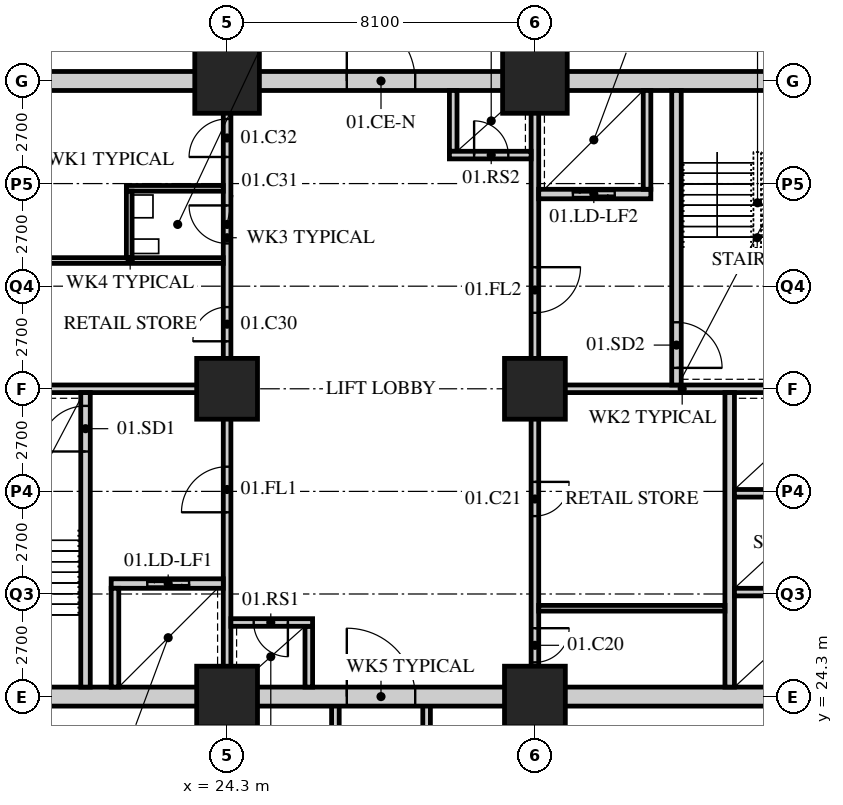
"""IFC4 building model, lengths in metres.
Left out: names, types, materials, properties, quantities, classifications, styles, units other than length and angle.
Written with IfcOpenShell. Run it as: python <this file> out.ifc"""

import sys

from ifc_helpers import new_model, si_unit, direction, frame, frame_2d, origin, origin_2d, place, context, subcontext, project, spatial, rectangle, hollow_rectangle, extrude, element, fill, save


model = new_model("IFC4")
c1 = context("Model", 3, precision=1e-05, world=origin(), true_north=direction((0.0, 1.0)))
c2 = subcontext(c1, "Body", "Model", "MODEL_VIEW")
j1 = project(units=[si_unit("LENGTHUNIT", "METRE"), si_unit("PLANEANGLEUNIT", "RADIAN")], contexts=[c1])
p1 = place(None, origin())
s1 = spatial("IfcSite", under=j1, at=p1, CompositionType="ELEMENT")
p2 = place(p1, origin())
s2 = spatial("IfcBuilding", under=s1, at=p2, CompositionType="ELEMENT")
p3 = place(p2, frame((0.0, 0.0, 6.0)))
s3 = spatial("IfcBuildingStorey", under=s2, at=p3, CompositionType="ELEMENT", Elevation=6.0)
for number, where, z_axis, x_axis in (
    (1, (24.3, 24.3, 0.0), (0.0, 0.0, 1.0), (1.0, 0.0, 0.0)),
    (2, (24.3, 32.4, 0.0), (0.0, 0.0, 1.0), (1.0, 0.0, 0.0)),
):
    element("IfcColumn", number, at=place(p3, frame(where, z_axis=z_axis, x_axis=x_axis)), inside=s3, PredefinedType="COLUMN", context=c2, shape_type="SweptSolid", body=[
        extrude(hollow_rectangle(XDim=1.6, YDim=1.6, WallThickness=0.15, at=origin_2d()), origin(), (0.0, 0.0, 1.0), 5.4),
    ])
p4 = place(p3, frame((24.3, 40.5, 0.0), z_axis=(0.0, 0.0, 1.0), x_axis=(1.0, 0.0, 0.0)))
e3 = element("IfcColumn", 3, at=p4, inside=s3, PredefinedType="COLUMN", context=c2, shape_type="SweptSolid", body=[
    extrude(hollow_rectangle(XDim=1.7, YDim=1.7, WallThickness=0.16, at=origin_2d()), origin(), (0.0, 0.0, 1.0), 5.4),
])
for number, where, z_axis, x_axis in (
    (4, (32.4, 24.3, 0.0), (0.0, 0.0, 1.0), (1.0, 0.0, 0.0)),
    (5, (32.4, 32.4, 0.0), (0.0, 0.0, 1.0), (1.0, 0.0, 0.0)),
):
    element("IfcColumn", number, at=place(p3, frame(where, z_axis=z_axis, x_axis=x_axis)), inside=s3, PredefinedType="COLUMN", context=c2, shape_type="SweptSolid", body=[
        extrude(hollow_rectangle(XDim=1.6, YDim=1.6, WallThickness=0.15, at=origin_2d()), origin(), (0.0, 0.0, 1.0), 5.4),
    ])
p5 = place(p3, frame((32.4, 40.5, 0.0), z_axis=(0.0, 0.0, 1.0), x_axis=(1.0, 0.0, 0.0)))
e6 = element("IfcColumn", 6, at=p5, inside=s3, PredefinedType="COLUMN", context=c2, shape_type="SweptSolid", body=[
    extrude(hollow_rectangle(XDim=1.7, YDim=1.7, WallThickness=0.16, at=origin_2d()), origin(), (0.0, 0.0, 1.0), 5.4),
])
for number, where, z_axis, x_axis in (
    (7, (27.15, 3.6, 0.0), (0.0, 0.0, 1.0), (0.0, 1.0, 0.0)),
    (8, (29.55, 3.6, 0.0), (0.0, 0.0, 1.0), (0.0, 1.0, 0.0)),
):
    element("IfcWall", number, at=place(p3, frame(where, z_axis=z_axis, x_axis=x_axis)), inside=s3, PredefinedType="SOLIDWALL", context=c2, shape_type="SweptSolid", body=[
        extrude(rectangle(XDim=20.7, YDim=0.2, at=frame_2d((10.35, 0.0))), origin(), (0.0, 0.0, 1.0), 5.15),
    ])
p6 = place(p3, frame((15.95, 24.3, 0.0), z_axis=(0.0, 0.0, 1.0), x_axis=(1.0, 0.0, 0.0)))
e9 = element("IfcWall", 9, at=p6, inside=s3, PredefinedType="SOLIDWALL", context=c2, shape_type="SweptSolid", body=[
    extrude(rectangle(XDim=24.8, YDim=0.5, at=frame_2d((12.4, 0.0))), origin(), (0.0, 0.0, 1.0), 4.5),
])
p7 = place(p6, frame((11.5, 0.0, 0.0)))
e10 = element("IfcOpeningElement", 10, at=p7, cuts=e9, PredefinedType="OPENING", context=c2, shape_type="SweptSolid", body=[
    extrude(rectangle(XDim=1.8, YDim=2.4, at=frame_2d((0.9, 1.2))), frame((0.0, 0.26, 0.0), z_axis=(0.0, -1.0, 0.0), x_axis=(1.0, 0.0, 0.0)), (0.0, 0.0, 1.0), 0.52),
])
p8 = place(p3, frame((15.95, 40.5, 0.0), z_axis=(0.0, 0.0, 1.0), x_axis=(1.0, 0.0, 0.0)))
e11 = element("IfcWall", 11, at=p8, inside=s3, PredefinedType="SOLIDWALL", context=c2, shape_type="SweptSolid", body=[
    extrude(rectangle(XDim=24.8, YDim=0.5, at=frame_2d((12.4, 0.0))), origin(), (0.0, 0.0, 1.0), 4.5),
])
p9 = place(p8, frame((11.5, 0.0, 0.0)))
e12 = element("IfcOpeningElement", 12, at=p9, cuts=e11, PredefinedType="OPENING", context=c2, shape_type="SweptSolid", body=[
    extrude(rectangle(XDim=1.8, YDim=2.4, at=frame_2d((0.9, 1.2))), frame((0.0, 0.26, 0.0), z_axis=(0.0, -1.0, 0.0), x_axis=(1.0, 0.0, 0.0)), (0.0, 0.0, 1.0), 0.52),
])
p10 = place(p3, frame((16.45, 32.4, 0.0), z_axis=(0.0, 0.0, 1.0), x_axis=(1.0, 0.0, 0.0)))
e13 = element("IfcWall", 13, at=p10, inside=s3, PredefinedType="SOLIDWALL", context=c2, shape_type="SweptSolid", body=[
    extrude(rectangle(XDim=7.95, YDim=0.2, at=frame_2d((3.975, 0.0))), origin(), (0.0, 0.0, 1.0), 4.45),
])
p11 = place(p3, frame((24.3, 24.55, 0.0), z_axis=(0.0, 0.0, 1.0), x_axis=(0.0, 1.0, 0.0)))
e14 = element("IfcWall", 14, at=p11, inside=s3, PredefinedType="SOLIDWALL", context=c2, shape_type="SweptSolid", body=[
    extrude(rectangle(XDim=7.75, YDim=0.2, at=frame_2d((3.875, 0.0))), origin(), (0.0, 0.0, 1.0), 4.45),
])
p12 = place(p11, frame((4.6, 0.0, 0.0)))
e15 = element("IfcOpeningElement", 15, at=p12, cuts=e14, PredefinedType="OPENING", context=c2, shape_type="SweptSolid", body=[
    extrude(rectangle(XDim=1.2, YDim=2.1, at=frame_2d((0.6, 1.05))), frame((0.0, 0.11, 0.0), z_axis=(0.0, -1.0, 0.0), x_axis=(1.0, 0.0, 0.0)), (0.0, 0.0, 1.0), 0.22),
])
p13 = place(p3, frame((20.575, 24.55, 0.0), z_axis=(0.0, 0.0, 1.0), x_axis=(0.0, 1.0, 0.0)))
e16 = element("IfcWall", 16, at=p13, inside=s3, PredefinedType="SOLIDWALL", context=c2, shape_type="SweptSolid", body=[
    extrude(rectangle(XDim=7.75, YDim=0.25, at=frame_2d((3.875, 0.0))), origin(), (0.0, 0.0, 1.0), 5.15),
])
p14 = place(p13, frame((6.2, 0.0, 0.0)))
e17 = element("IfcOpeningElement", 17, at=p14, cuts=e16, PredefinedType="OPENING", context=c2, shape_type="SweptSolid", body=[
    extrude(rectangle(XDim=1.2, YDim=2.1, at=frame_2d((0.6, 1.05))), frame((0.0, 0.135, 0.0), z_axis=(0.0, -1.0, 0.0), x_axis=(1.0, 0.0, 0.0)), (0.0, 0.0, 1.0), 0.27),
])
p15 = place(p3, frame((21.25, 27.275, 0.0), z_axis=(0.0, 0.0, 1.0), x_axis=(1.0, 0.0, 0.0)))
e18 = element("IfcWall", 18, at=p15, inside=s3, PredefinedType="SOLIDWALL", context=c2, shape_type="SweptSolid", body=[
    extrude(rectangle(XDim=2.95, YDim=0.25, at=frame_2d((1.475, 0.0))), origin(), (0.0, 0.0, 1.0), 5.15),
])
p16 = place(p15, frame((0.95, 0.0, 0.0)))
e19 = element("IfcOpeningElement", 19, at=p16, cuts=e18, PredefinedType="OPENING", context=c2, shape_type="SweptSolid", body=[
    extrude(rectangle(XDim=1.1, YDim=2.4, at=frame_2d((0.55, 1.2))), frame((0.0, 0.135, 0.0), z_axis=(0.0, -1.0, 0.0), x_axis=(1.0, 0.0, 0.0)), (0.0, 0.0, 1.0), 0.27),
])
p17 = place(p3, frame((21.35, 24.55, 0.0), z_axis=(0.0, 0.0, 1.0), x_axis=(0.0, 1.0, 0.0)))
e20 = element("IfcWall", 20, at=p17, inside=s3, PredefinedType="SOLIDWALL", context=c2, shape_type="SweptSolid", body=[
    extrude(rectangle(XDim=2.6, YDim=0.2, at=frame_2d((1.3, 0.0))), origin(), (0.0, 0.0, 1.0), 5.15),
])
p18 = place(p3, frame((26.45, 24.55, 0.0), z_axis=(0.0, 0.0, 1.0), x_axis=(0.0, 1.0, 0.0)))
e21 = element("IfcWall", 21, at=p18, inside=s3, PredefinedType="SOLIDWALL", context=c2, shape_type="SweptSolid", body=[
    extrude(rectangle(XDim=1.6, YDim=0.2, at=frame_2d((0.8, 0.0))), origin(), (0.0, 0.0, 1.0), 5.15),
])
p19 = place(p3, frame((24.4, 26.25, 0.0), z_axis=(0.0, 0.0, 1.0), x_axis=(1.0, 0.0, 0.0)))
e22 = element("IfcWall", 22, at=p19, inside=s3, PredefinedType="SOLIDWALL", context=c2, shape_type="SweptSolid", body=[
    extrude(rectangle(XDim=2.15, YDim=0.2, at=frame_2d((1.075, 0.0))), origin(), (0.0, 0.0, 1.0), 5.15),
])
p20 = place(p19, frame((0.6, 0.0, 0.0)))
e23 = element("IfcOpeningElement", 23, at=p20, cuts=e22, PredefinedType="OPENING", context=c2, shape_type="SweptSolid", body=[
    extrude(rectangle(XDim=0.9, YDim=2.1, at=frame_2d((0.45, 1.05))), frame((0.0, 0.11, 0.0), z_axis=(0.0, -1.0, 0.0), x_axis=(1.0, 0.0, 0.0)), (0.0, 0.0, 1.0), 0.22),
])
p21 = place(p3, frame((32.3, 32.4, 0.0), z_axis=(0.0, 0.0, 1.0), x_axis=(1.0, 0.0, 0.0)))
e24 = element("IfcWall", 24, at=p21, inside=s3, PredefinedType="SOLIDWALL", context=c2, shape_type="SweptSolid", body=[
    extrude(rectangle(XDim=7.95, YDim=0.2, at=frame_2d((3.975, 0.0))), origin(), (0.0, 0.0, 1.0), 4.45),
])
p22 = place(p3, frame((32.4, 32.5, 0.0), z_axis=(0.0, 0.0, 1.0), x_axis=(0.0, 1.0, 0.0)))
e25 = element("IfcWall", 25, at=p22, inside=s3, PredefinedType="SOLIDWALL", context=c2, shape_type="SweptSolid", body=[
    extrude(rectangle(XDim=7.75, YDim=0.2, at=frame_2d((3.875, 0.0))), origin(), (0.0, 0.0, 1.0), 4.45),
])
p23 = place(p22, frame((1.9, 0.0, 0.0)))
e26 = element("IfcOpeningElement", 26, at=p23, cuts=e25, PredefinedType="OPENING", context=c2, shape_type="SweptSolid", body=[
    extrude(rectangle(XDim=1.2, YDim=2.1, at=frame_2d((0.6, 1.05))), frame((0.0, 0.11, 0.0), z_axis=(0.0, -1.0, 0.0), x_axis=(1.0, 0.0, 0.0)), (0.0, 0.0, 1.0), 0.22),
])
p24 = place(p3, frame((37.525, 24.55, 0.0), z_axis=(0.0, 0.0, 1.0), x_axis=(0.0, 1.0, 0.0)))
e27 = element("IfcWall", 27, at=p24, inside=s3, PredefinedType="SOLIDWALL", context=c2, shape_type="SweptSolid", body=[
    extrude(rectangle(XDim=7.75, YDim=0.25, at=frame_2d((3.875, 0.0))), origin(), (0.0, 0.0, 1.0), 5.15),
])
for number, where, z_axis, x_axis in (
    (28, (37.65, 27.05, 0.0), (0.0, 0.0, 1.0), (1.0, 0.0, 0.0)),
    (29, (37.65, 29.65, 0.0), (0.0, 0.0, 1.0), (1.0, 0.0, 0.0)),
):
    element("IfcWall", number, at=place(p3, frame(where, z_axis=z_axis, x_axis=x_axis)), inside=s3, PredefinedType="SOLIDWALL", context=c2, shape_type="SweptSolid", body=[
        extrude(rectangle(XDim=2.6, YDim=0.2, at=frame_2d((1.3, 0.0))), origin(), (0.0, 0.0, 1.0), 5.15),
    ])
p25 = place(p3, frame((36.125, 32.5, 0.0), z_axis=(0.0, 0.0, 1.0), x_axis=(0.0, 1.0, 0.0)))
e30 = element("IfcWall", 30, at=p25, inside=s3, PredefinedType="SOLIDWALL", context=c2, shape_type="SweptSolid", body=[
    extrude(rectangle(XDim=7.75, YDim=0.25, at=frame_2d((3.875, 0.0))), origin(), (0.0, 0.0, 1.0), 5.15),
])
p26 = place(p25, frame((0.45, 0.0, 0.0)))
e31 = element("IfcOpeningElement", 31, at=p26, cuts=e30, PredefinedType="OPENING", context=c2, shape_type="SweptSolid", body=[
    extrude(rectangle(XDim=1.2, YDim=2.1, at=frame_2d((0.6, 1.05))), frame((0.0, 0.135, 0.0), z_axis=(0.0, -1.0, 0.0), x_axis=(1.0, 0.0, 0.0)), (0.0, 0.0, 1.0), 0.27),
])
p27 = place(p3, frame((32.5, 37.525, 0.0), z_axis=(0.0, 0.0, 1.0), x_axis=(1.0, 0.0, 0.0)))
e32 = element("IfcWall", 32, at=p27, inside=s3, PredefinedType="SOLIDWALL", context=c2, shape_type="SweptSolid", body=[
    extrude(rectangle(XDim=2.95, YDim=0.25, at=frame_2d((1.475, 0.0))), origin(), (0.0, 0.0, 1.0), 5.15),
])
p28 = place(p27, frame((0.9, 0.0, 0.0)))
e33 = element("IfcOpeningElement", 33, at=p28, cuts=e32, PredefinedType="OPENING", context=c2, shape_type="SweptSolid", body=[
    extrude(rectangle(XDim=1.1, YDim=2.4, at=frame_2d((0.55, 1.2))), frame((0.0, 0.135, 0.0), z_axis=(0.0, -1.0, 0.0), x_axis=(1.0, 0.0, 0.0)), (0.0, 0.0, 1.0), 0.27),
])
p29 = place(p3, frame((35.35, 37.65, 0.0), z_axis=(0.0, 0.0, 1.0), x_axis=(0.0, 1.0, 0.0)))
e34 = element("IfcWall", 34, at=p29, inside=s3, PredefinedType="SOLIDWALL", context=c2, shape_type="SweptSolid", body=[
    extrude(rectangle(XDim=2.6, YDim=0.2, at=frame_2d((1.3, 0.0))), origin(), (0.0, 0.0, 1.0), 5.15),
])
p30 = place(p3, frame((30.25, 38.65, 0.0), z_axis=(0.0, 0.0, 1.0), x_axis=(0.0, 1.0, 0.0)))
e35 = element("IfcWall", 35, at=p30, inside=s3, PredefinedType="SOLIDWALL", context=c2, shape_type="SweptSolid", body=[
    extrude(rectangle(XDim=1.6, YDim=0.2, at=frame_2d((0.8, 0.0))), origin(), (0.0, 0.0, 1.0), 5.15),
])
p31 = place(p3, frame((30.15, 38.55, 0.0), z_axis=(0.0, 0.0, 1.0), x_axis=(1.0, 0.0, 0.0)))
e36 = element("IfcWall", 36, at=p31, inside=s3, PredefinedType="SOLIDWALL", context=c2, shape_type="SweptSolid", body=[
    extrude(rectangle(XDim=2.15, YDim=0.2, at=frame_2d((1.075, 0.0))), origin(), (0.0, 0.0, 1.0), 5.15),
])
p32 = place(p31, frame((0.65, 0.0, 0.0)))
e37 = element("IfcOpeningElement", 37, at=p32, cuts=e36, PredefinedType="OPENING", context=c2, shape_type="SweptSolid", body=[
    extrude(rectangle(XDim=0.9, YDim=2.1, at=frame_2d((0.45, 1.05))), frame((0.0, 0.11, 0.0), z_axis=(0.0, -1.0, 0.0), x_axis=(1.0, 0.0, 0.0)), (0.0, 0.0, 1.0), 0.22),
])
p33 = place(p3, frame((24.3, 32.5, 0.0), z_axis=(0.0, 0.0, 1.0), x_axis=(0.0, 1.0, 0.0)))
e38 = element("IfcWall", 38, at=p33, inside=s3, PredefinedType="PARTITIONING", context=c2, shape_type="SweptSolid", body=[
    extrude(rectangle(XDim=7.75, YDim=0.2, at=frame_2d((3.875, 0.0))), origin(), (0.0, 0.0, 1.0), 4.45),
])
p34 = place(p33, frame((1.15, 0.0, 0.0)))
e39 = element("IfcOpeningElement", 39, at=p34, cuts=e38, PredefinedType="OPENING", context=c2, shape_type="SweptSolid", body=[
    extrude(rectangle(XDim=0.9, YDim=2.1, at=frame_2d((0.45, 1.05))), frame((0.0, 0.11, 0.0), z_axis=(0.0, -1.0, 0.0), x_axis=(1.0, 0.0, 0.0)), (0.0, 0.0, 1.0), 0.22),
])
p35 = place(p33, frame((3.725, 0.0, 0.0)))
e40 = element("IfcOpeningElement", 40, at=p35, cuts=e38, PredefinedType="OPENING", context=c2, shape_type="SweptSolid", body=[
    extrude(rectangle(XDim=1.0, YDim=2.1, at=frame_2d((0.5, 1.05))), frame((0.0, 0.11, 0.0), z_axis=(0.0, -1.0, 0.0), x_axis=(1.0, 0.0, 0.0)), (0.0, 0.0, 1.0), 0.22),
])
p36 = place(p33, frame((6.0, 0.0, 0.0)))
e41 = element("IfcOpeningElement", 41, at=p36, cuts=e38, PredefinedType="OPENING", context=c2, shape_type="SweptSolid", body=[
    extrude(rectangle(XDim=1.0, YDim=2.1, at=frame_2d((0.5, 1.05))), frame((0.0, 0.11, 0.0), z_axis=(0.0, -1.0, 0.0), x_axis=(1.0, 0.0, 0.0)), (0.0, 0.0, 1.0), 0.22),
])
p37 = place(p3, frame((19.3, 35.775, 0.0), z_axis=(0.0, 0.0, 1.0), x_axis=(1.0, 0.0, 0.0)))
e42 = element("IfcWall", 42, at=p37, inside=s3, PredefinedType="PARTITIONING", context=c2, shape_type="SweptSolid", body=[
    extrude(rectangle(XDim=4.9, YDim=0.15, at=frame_2d((2.45, 0.0))), origin(), (0.0, 0.0, 1.0), 5.15),
])
p38 = place(p3, frame((21.65, 37.675, 0.0), z_axis=(0.0, 0.0, 1.0), x_axis=(1.0, 0.0, 0.0)))
e43 = element("IfcWall", 43, at=p38, inside=s3, PredefinedType="PARTITIONING", context=c2, shape_type="SweptSolid", body=[
    extrude(rectangle(XDim=2.55, YDim=0.15, at=frame_2d((1.275, 0.0))), origin(), (0.0, 0.0, 1.0), 5.15),
])
p39 = place(p3, frame((21.725, 35.85, 0.0), z_axis=(0.0, 0.0, 1.0), x_axis=(0.0, 1.0, 0.0)))
e44 = element("IfcWall", 44, at=p39, inside=s3, PredefinedType="PARTITIONING", context=c2, shape_type="SweptSolid", body=[
    extrude(rectangle(XDim=1.75, YDim=0.15, at=frame_2d((0.875, 0.0))), origin(), (0.0, 0.0, 1.0), 5.15),
])
p40 = place(p3, frame((32.4, 24.55, 0.0), z_axis=(0.0, 0.0, 1.0), x_axis=(0.0, 1.0, 0.0)))
e45 = element("IfcWall", 45, at=p40, inside=s3, PredefinedType="PARTITIONING", context=c2, shape_type="SweptSolid", body=[
    extrude(rectangle(XDim=7.75, YDim=0.2, at=frame_2d((3.875, 0.0))), origin(), (0.0, 0.0, 1.0), 4.45),
])
p41 = place(p40, frame((0.65, 0.0, 0.0)))
e46 = element("IfcOpeningElement", 46, at=p41, cuts=e45, PredefinedType="OPENING", context=c2, shape_type="SweptSolid", body=[
    extrude(rectangle(XDim=0.9, YDim=2.1, at=frame_2d((0.45, 1.05))), frame((0.0, 0.11, 0.0), z_axis=(0.0, -1.0, 0.0), x_axis=(1.0, 0.0, 0.0)), (0.0, 0.0, 1.0), 0.22),
])
p42 = place(p40, frame((4.5, 0.0, 0.0)))
e47 = element("IfcOpeningElement", 47, at=p42, cuts=e45, PredefinedType="OPENING", context=c2, shape_type="SweptSolid", body=[
    extrude(rectangle(XDim=0.9, YDim=2.1, at=frame_2d((0.45, 1.05))), frame((0.0, 0.11, 0.0), z_axis=(0.0, -1.0, 0.0), x_axis=(1.0, 0.0, 0.0)), (0.0, 0.0, 1.0), 0.22),
])
p43 = place(p3, frame((32.5, 26.625, 0.0), z_axis=(0.0, 0.0, 1.0), x_axis=(1.0, 0.0, 0.0)))
e48 = element("IfcWall", 48, at=p43, inside=s3, PredefinedType="PARTITIONING", context=c2, shape_type="SweptSolid", body=[
    extrude(rectangle(XDim=4.9, YDim=0.15, at=frame_2d((2.45, 0.0))), origin(), (0.0, 0.0, 1.0), 5.15),
])
p44 = place(p34, origin())
e49 = element("IfcDoor", 49, at=p44, inside=s3, OperationType="SINGLE_SWING_LEFT", PredefinedType="DOOR", context=c2, shape_type="SweptSolid", body=[
    extrude(rectangle(XDim=0.9, YDim=2.1, at=frame_2d((0.45, 1.05))), frame((0.0, 0.025, 0.0), z_axis=(0.0, -1.0, 0.0), x_axis=(1.0, 0.0, 0.0)), (0.0, 0.0, 1.0), 0.05),
])
fill(e39, e49)
p45 = place(p35, origin())
e50 = element("IfcDoor", 50, at=p45, inside=s3, OperationType="SINGLE_SWING_RIGHT", PredefinedType="DOOR", context=c2, shape_type="SweptSolid", body=[
    extrude(rectangle(XDim=1.0, YDim=2.1, at=frame_2d((0.5, 1.05))), frame((0.0, 0.025, 0.0), z_axis=(0.0, -1.0, 0.0), x_axis=(1.0, 0.0, 0.0)), (0.0, 0.0, 1.0), 0.05),
])
fill(e40, e50)
p46 = place(p36, origin())
e51 = element("IfcDoor", 51, at=p46, inside=s3, OperationType="SINGLE_SWING_LEFT", PredefinedType="DOOR", context=c2, shape_type="SweptSolid", body=[
    extrude(rectangle(XDim=1.0, YDim=2.1, at=frame_2d((0.5, 1.05))), frame((0.0, 0.025, 0.0), z_axis=(0.0, -1.0, 0.0), x_axis=(1.0, 0.0, 0.0)), (0.0, 0.0, 1.0), 0.05),
])
fill(e41, e51)
p47 = place(p41, origin())
e52 = element("IfcDoor", 52, at=p47, inside=s3, OperationType="SINGLE_SWING_LEFT", PredefinedType="DOOR", context=c2, shape_type="SweptSolid", body=[
    extrude(rectangle(XDim=0.9, YDim=2.1, at=frame_2d((0.45, 1.05))), frame((0.0, 0.025, 0.0), z_axis=(0.0, -1.0, 0.0), x_axis=(1.0, 0.0, 0.0)), (0.0, 0.0, 1.0), 0.05),
])
fill(e46, e52)
p48 = place(p42, origin())
e53 = element("IfcDoor", 53, at=p48, inside=s3, OperationType="SINGLE_SWING_LEFT", PredefinedType="DOOR", context=c2, shape_type="SweptSolid", body=[
    extrude(rectangle(XDim=0.9, YDim=2.1, at=frame_2d((0.45, 1.05))), frame((0.0, 0.025, 0.0), z_axis=(0.0, -1.0, 0.0), x_axis=(1.0, 0.0, 0.0)), (0.0, 0.0, 1.0), 0.05),
])
fill(e47, e53)
p49 = place(p14, origin())
e54 = element("IfcDoor", 54, at=p49, inside=s3, OperationType="SINGLE_SWING_LEFT", PredefinedType="DOOR", context=c2, shape_type="SweptSolid", body=[
    extrude(rectangle(XDim=1.2, YDim=2.1, at=frame_2d((0.6, 1.05))), frame((0.0, 0.025, 0.0), z_axis=(0.0, -1.0, 0.0), x_axis=(1.0, 0.0, 0.0)), (0.0, 0.0, 1.0), 0.05),
])
fill(e17, e54)
p50 = place(p12, origin())
e55 = element("IfcDoor", 55, at=p50, inside=s3, OperationType="SINGLE_SWING_LEFT", PredefinedType="DOOR", context=c2, shape_type="SweptSolid", body=[
    extrude(rectangle(XDim=1.2, YDim=2.1, at=frame_2d((0.6, 1.05))), frame((0.0, 0.025, 0.0), z_axis=(0.0, -1.0, 0.0), x_axis=(1.0, 0.0, 0.0)), (0.0, 0.0, 1.0), 0.05),
])
fill(e15, e55)
p51 = place(p20, origin())
e56 = element("IfcDoor", 56, at=p51, inside=s3, OperationType="SINGLE_SWING_LEFT", PredefinedType="DOOR", context=c2, shape_type="SweptSolid", body=[
    extrude(rectangle(XDim=0.9, YDim=2.1, at=frame_2d((0.45, 1.05))), frame((0.0, 0.025, 0.0), z_axis=(0.0, -1.0, 0.0), x_axis=(1.0, 0.0, 0.0)), (0.0, 0.0, 1.0), 0.05),
])
fill(e23, e56)
p52 = place(p26, origin())
e57 = element("IfcDoor", 57, at=p52, inside=s3, OperationType="SINGLE_SWING_RIGHT", PredefinedType="DOOR", context=c2, shape_type="SweptSolid", body=[
    extrude(rectangle(XDim=1.2, YDim=2.1, at=frame_2d((0.6, 1.05))), frame((0.0, 0.025, 0.0), z_axis=(0.0, -1.0, 0.0), x_axis=(1.0, 0.0, 0.0)), (0.0, 0.0, 1.0), 0.05),
])
fill(e31, e57)
p53 = place(p23, origin())
e58 = element("IfcDoor", 58, at=p53, inside=s3, OperationType="SINGLE_SWING_LEFT", PredefinedType="DOOR", context=c2, shape_type="SweptSolid", body=[
    extrude(rectangle(XDim=1.2, YDim=2.1, at=frame_2d((0.6, 1.05))), frame((0.0, 0.025, 0.0), z_axis=(0.0, -1.0, 0.0), x_axis=(1.0, 0.0, 0.0)), (0.0, 0.0, 1.0), 0.05),
])
fill(e26, e58)
p54 = place(p32, origin())
e59 = element("IfcDoor", 59, at=p54, inside=s3, OperationType="SINGLE_SWING_LEFT", PredefinedType="DOOR", context=c2, shape_type="SweptSolid", body=[
    extrude(rectangle(XDim=0.9, YDim=2.1, at=frame_2d((0.45, 1.05))), frame((0.0, 0.025, 0.0), z_axis=(0.0, -1.0, 0.0), x_axis=(1.0, 0.0, 0.0)), (0.0, 0.0, 1.0), 0.05),
])
fill(e37, e59)
p55 = place(p16, origin())
e60 = element("IfcDoor", 60, at=p55, inside=s3, OperationType="DOUBLE_DOOR_SLIDING", PredefinedType="DOOR", context=c2, shape_type="SweptSolid", body=[
    extrude(rectangle(XDim=1.1, YDim=2.4, at=frame_2d((0.55, 1.2))), frame((0.0, 0.025, 0.0), z_axis=(0.0, -1.0, 0.0), x_axis=(1.0, 0.0, 0.0)), (0.0, 0.0, 1.0), 0.05),
])
fill(e19, e60)
p56 = place(p28, origin())
e61 = element("IfcDoor", 61, at=p56, inside=s3, OperationType="DOUBLE_DOOR_SLIDING", PredefinedType="DOOR", context=c2, shape_type="SweptSolid", body=[
    extrude(rectangle(XDim=1.1, YDim=2.4, at=frame_2d((0.55, 1.2))), frame((0.0, 0.025, 0.0), z_axis=(0.0, -1.0, 0.0), x_axis=(1.0, 0.0, 0.0)), (0.0, 0.0, 1.0), 0.05),
])
fill(e33, e61)
p57 = place(p7, origin())
e62 = element("IfcDoor", 62, at=p57, inside=s3, OperationType="DOUBLE_DOOR_SINGLE_SWING", PredefinedType="DOOR", context=c2, shape_type="SweptSolid", body=[
    extrude(rectangle(XDim=1.8, YDim=2.4, at=frame_2d((0.9, 1.2))), frame((0.0, 0.025, 0.0), z_axis=(0.0, -1.0, 0.0), x_axis=(1.0, 0.0, 0.0)), (0.0, 0.0, 1.0), 0.05),
])
fill(e10, e62)
p58 = place(p9, origin())
e63 = element("IfcDoor", 63, at=p58, inside=s3, OperationType="DOUBLE_DOOR_SINGLE_SWING", PredefinedType="DOOR", context=c2, shape_type="SweptSolid", body=[
    extrude(rectangle(XDim=1.8, YDim=2.4, at=frame_2d((0.9, 1.2))), frame((0.0, 0.025, 0.0), z_axis=(0.0, -1.0, 0.0), x_axis=(1.0, 0.0, 0.0)), (0.0, 0.0, 1.0), 0.05),
])
fill(e12, e63)
save(model, sys.argv[1])
